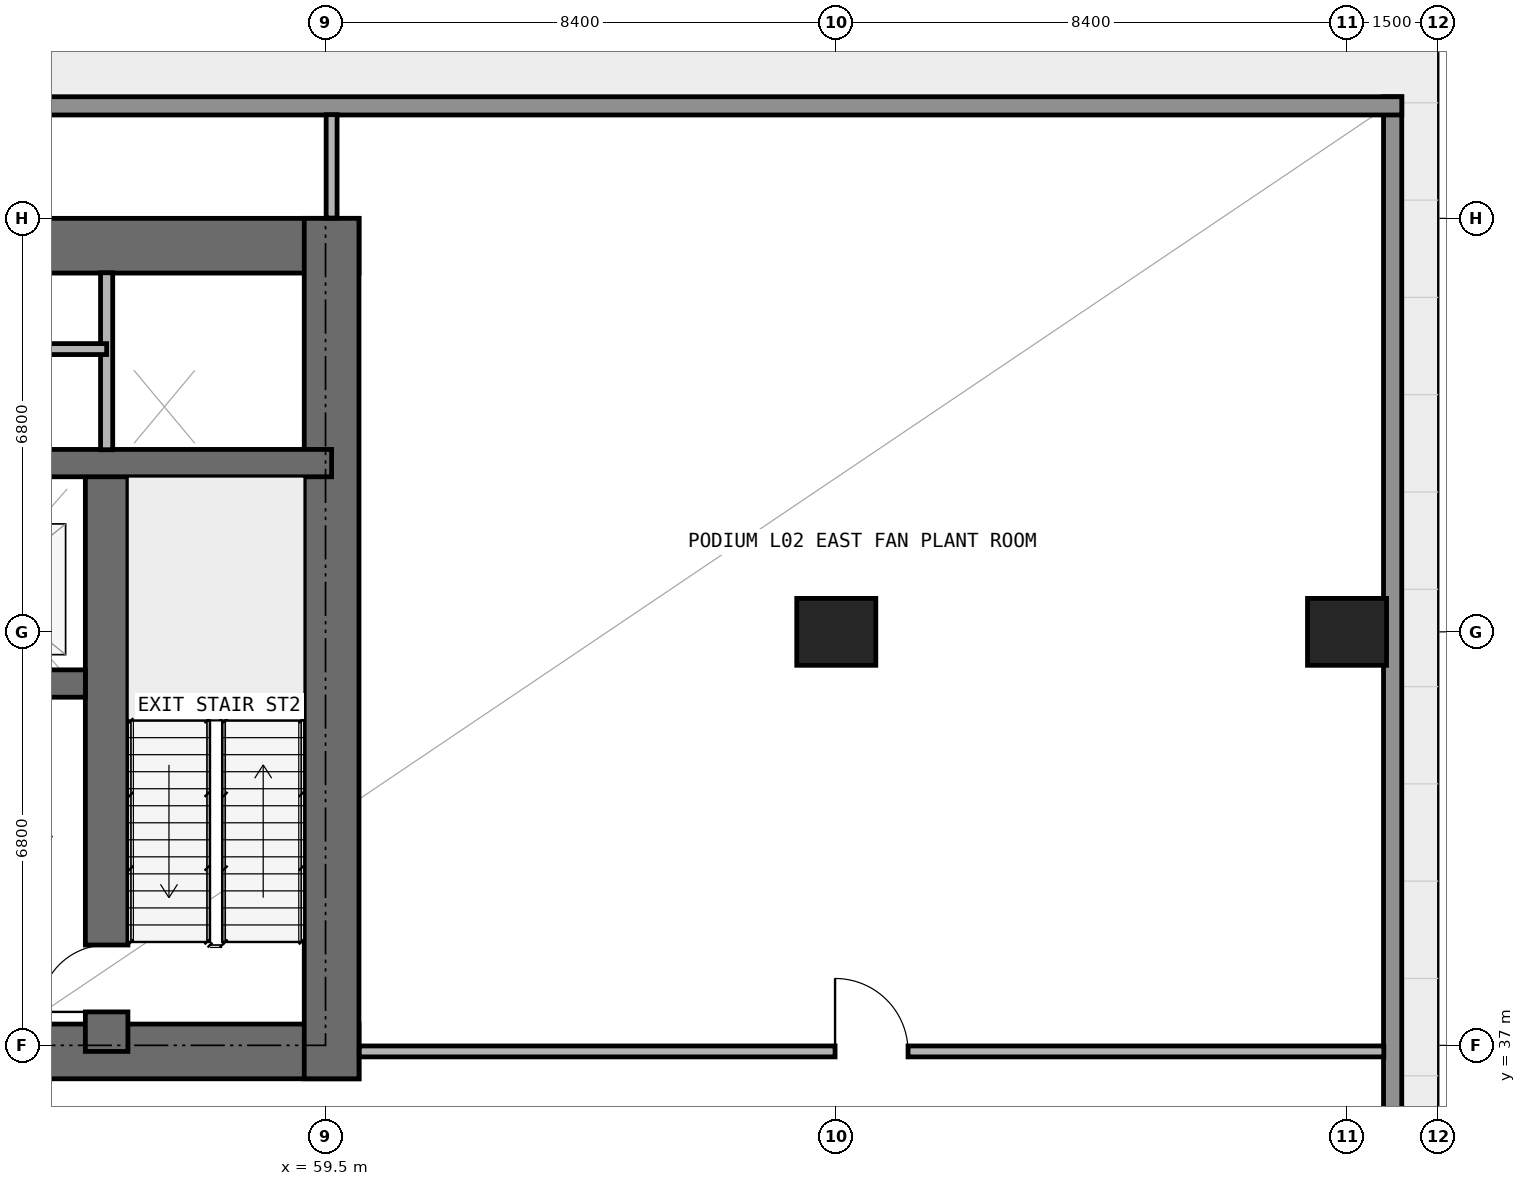
"""IFC4 building model, lengths in metres.
Left out: names, types, materials, properties, quantities, classifications, styles, units other than length and angle.
Written with IfcOpenShell. Run it as: python <this file> out.ifc"""

import sys

from ifc_helpers import new_model, si_unit, direction, frame, frame_2d, origin, origin_2d, place, context, subcontext, project, spatial, rectangle, extrude, element, fill, save


model = new_model("IFC4")
c1 = context("Model", 3, precision=1e-05, world=origin(), true_north=direction((0.0, 1.0)))
c2 = subcontext(c1, "Body", "Model", "MODEL_VIEW")
j1 = project(units=[si_unit("LENGTHUNIT", "METRE"), si_unit("PLANEANGLEUNIT", "RADIAN")], contexts=[c1])
p1 = place(None, origin())
s1 = spatial("IfcSite", under=j1, at=p1, CompositionType="ELEMENT")
p2 = place(p1, origin())
s2 = spatial("IfcBuilding", under=s1, at=p2, CompositionType="ELEMENT")
p3 = place(p2, frame((0.0, 0.0, 10.2)))
s3 = spatial("IfcBuildingStorey", under=s2, at=p3, CompositionType="ELEMENT", Elevation=10.2)
for number, where, z_axis, x_axis in (
    (1, (67.9, 43.8, 0.0), (0.0, 0.0, 1.0), (1.0, 0.0, 0.0)),
    (2, (76.3, 43.8, 0.0), (0.0, 0.0, 1.0), (1.0, 0.0, 0.0)),
):
    element("IfcColumn", number, at=place(p3, frame(where, z_axis=z_axis, x_axis=x_axis)), inside=s3, PredefinedType="COLUMN", context=c2, shape_type="SweptSolid", body=[
        extrude(rectangle(XDim=1.3, YDim=1.1, at=origin_2d()), origin(), (0.0, 0.0, 1.0), 4.5),
    ])
p4 = place(p3, frame((17.75, 36.9, 0.0), z_axis=(0.0, 0.0, 1.0), x_axis=(1.0, 0.0, 0.0)))
e3 = element("IfcWall", 3, at=p4, inside=s3, PredefinedType="SHEAR", context=c2, shape_type="SweptSolid", body=[
    extrude(rectangle(XDim=42.3, YDim=0.9, at=frame_2d((21.15, 0.0))), origin(), (0.0, 0.0, 1.0), 4.5),
])
p5 = place(p4, frame((14.55, 0.0, 0.0)))
e4 = element("IfcOpeningElement", 4, at=p5, cuts=e3, PredefinedType="OPENING", context=c2, shape_type="SweptSolid", body=[
    extrude(rectangle(XDim=1.1, YDim=2.15, at=frame_2d((0.55, 1.075))), frame((0.0, 0.46, 0.0), z_axis=(0.0, -1.0, 0.0), x_axis=(1.0, 0.0, 0.0)), (0.0, 0.0, 1.0), 0.92),
])
p6 = place(p4, frame((6.4, 0.0, 0.0)))
e5 = element("IfcOpeningElement", 5, at=p6, cuts=e3, PredefinedType="OPENING", context=c2, shape_type="SweptSolid", body=[
    extrude(rectangle(XDim=1.05, YDim=2.15, at=frame_2d((0.525, 1.075))), frame((0.0, 0.46, 0.0), z_axis=(0.0, -1.0, 0.0), x_axis=(1.0, 0.0, 0.0)), (0.0, 0.0, 1.0), 0.92),
])
p7 = place(p4, frame((34.9, 0.0, 0.0)))
e6 = element("IfcOpeningElement", 6, at=p7, cuts=e3, PredefinedType="OPENING", context=c2, shape_type="SweptSolid", body=[
    extrude(rectangle(XDim=1.05, YDim=2.15, at=frame_2d((0.525, 1.075))), frame((0.0, 0.46, 0.0), z_axis=(0.0, -1.0, 0.0), x_axis=(1.0, 0.0, 0.0)), (0.0, 0.0, 1.0), 0.92),
])
p8 = place(p4, frame((11.012, 0.0, 0.0)))
e7 = element("IfcOpeningElement", 7, at=p8, cuts=e3, PredefinedType="OPENING", context=c2, shape_type="SweptSolid", body=[
    extrude(rectangle(XDim=1.05, YDim=2.15, at=frame_2d((0.525, 1.075))), frame((0.0, 0.46, 0.0), z_axis=(0.0, -1.0, 0.0), x_axis=(1.0, 0.0, 0.0)), (0.0, 0.0, 1.0), 0.92),
])
p9 = place(p4, frame((24.25, 0.0, 0.0)))
e8 = element("IfcOpeningElement", 8, at=p9, cuts=e3, PredefinedType="OPENING", context=c2, shape_type="SweptSolid", body=[
    extrude(rectangle(XDim=1.05, YDim=2.15, at=frame_2d((0.525, 1.075))), frame((0.0, 0.46, 0.0), z_axis=(0.0, -1.0, 0.0), x_axis=(1.0, 0.0, 0.0)), (0.0, 0.0, 1.0), 0.92),
])
p10 = place(p3, frame((17.75, 50.15, 0.0), z_axis=(0.0, 0.0, 1.0), x_axis=(1.0, 0.0, 0.0)))
e9 = element("IfcWall", 9, at=p10, inside=s3, PredefinedType="SHEAR", context=c2, shape_type="SweptSolid", body=[
    extrude(rectangle(XDim=42.3, YDim=0.9, at=frame_2d((21.15, 0.0))), origin(), (0.0, 0.0, 1.0), 4.5),
])
p11 = place(p3, frame((59.6, 36.45, 0.0), z_axis=(0.0, 0.0, 1.0), x_axis=(0.0, 1.0, 0.0)))
e10 = element("IfcWall", 10, at=p11, inside=s3, PredefinedType="SHEAR", context=c2, shape_type="SweptSolid", body=[
    extrude(rectangle(XDim=14.15, YDim=0.9, at=frame_2d((7.075, 0.0))), origin(), (0.0, 0.0, 1.0), 4.5),
])
p12 = place(p3, frame((55.9, 36.9, 0.0), z_axis=(0.0, 0.0, 1.0), x_axis=(0.0, 1.0, 0.0)))
e11 = element("IfcWall", 11, at=p12, inside=s3, PredefinedType="SHEAR", context=c2, shape_type="SweptSolid", body=[
    extrude(rectangle(XDim=9.675, YDim=0.7, at=frame_2d((4.837, 0.0))), origin(), (0.0, 0.0, 1.0), 4.5),
])
p13 = place(p12, frame((0.65, 0.0, 0.0)))
e12 = element("IfcOpeningElement", 12, at=p13, cuts=e11, PredefinedType="OPENING", context=c2, shape_type="SweptSolid", body=[
    extrude(rectangle(XDim=1.1, YDim=2.15, at=frame_2d((0.55, 1.075))), frame((0.0, 0.36, 0.0), z_axis=(0.0, -1.0, 0.0), x_axis=(1.0, 0.0, 0.0)), (0.0, 0.0, 1.0), 0.72),
])
p14 = place(p3, frame((22.25, 42.95, 0.0), z_axis=(0.0, 0.0, 1.0), x_axis=(1.0, 0.0, 0.0)))
e13 = element("IfcWall", 13, at=p14, inside=s3, PredefinedType="SHEAR", context=c2, shape_type="SweptSolid", body=[
    extrude(rectangle(XDim=33.3, YDim=0.45, at=frame_2d((16.65, 0.0))), origin(), (0.0, 0.0, 1.0), 4.5),
])
p15 = place(p14, frame((1.05, 0.0, 0.0)))
e14 = element("IfcOpeningElement", 14, at=p15, cuts=e13, PredefinedType="OPENING", context=c2, shape_type="SweptSolid", body=[
    extrude(rectangle(XDim=1.2, YDim=2.2, at=frame_2d((0.6, 1.1))), frame((0.0, 0.235, 0.0), z_axis=(0.0, -1.0, 0.0), x_axis=(1.0, 0.0, 0.0)), (0.0, 0.0, 1.0), 0.47),
])
p16 = place(p14, frame((31.05, 0.0, 0.0)))
e15 = element("IfcOpeningElement", 15, at=p16, cuts=e13, PredefinedType="OPENING", context=c2, shape_type="SweptSolid", body=[
    extrude(rectangle(XDim=1.2, YDim=2.2, at=frame_2d((0.6, 1.1))), frame((0.0, 0.235, 0.0), z_axis=(0.0, -1.0, 0.0), x_axis=(1.0, 0.0, 0.0)), (0.0, 0.0, 1.0), 0.47),
])
p17 = place(p14, frame((13.5, 0.0, 0.0)))
e16 = element("IfcOpeningElement", 16, at=p17, cuts=e13, PredefinedType="OPENING", context=c2, shape_type="SweptSolid", body=[
    extrude(rectangle(XDim=1.1, YDim=2.2, at=frame_2d((0.55, 1.1))), frame((0.0, 0.235, 0.0), z_axis=(0.0, -1.0, 0.0), x_axis=(1.0, 0.0, 0.0)), (0.0, 0.0, 1.0), 0.47),
])
p18 = place(p14, frame((16.1, 0.0, 0.0)))
e17 = element("IfcOpeningElement", 17, at=p18, cuts=e13, PredefinedType="OPENING", context=c2, shape_type="SweptSolid", body=[
    extrude(rectangle(XDim=1.1, YDim=2.2, at=frame_2d((0.55, 1.1))), frame((0.0, 0.235, 0.0), z_axis=(0.0, -1.0, 0.0), x_axis=(1.0, 0.0, 0.0)), (0.0, 0.0, 1.0), 0.47),
])
p19 = place(p14, frame((18.7, 0.0, 0.0)))
e18 = element("IfcOpeningElement", 18, at=p19, cuts=e13, PredefinedType="OPENING", context=c2, shape_type="SweptSolid", body=[
    extrude(rectangle(XDim=1.1, YDim=2.2, at=frame_2d((0.55, 1.1))), frame((0.0, 0.235, 0.0), z_axis=(0.0, -1.0, 0.0), x_axis=(1.0, 0.0, 0.0)), (0.0, 0.0, 1.0), 0.47),
])
p20 = place(p14, frame((3.625, 0.0, 0.0)))
e19 = element("IfcOpeningElement", 19, at=p20, cuts=e13, PredefinedType="OPENING", context=c2, shape_type="SweptSolid", body=[
    extrude(rectangle(XDim=1.05, YDim=2.15, at=frame_2d((0.525, 1.075))), frame((0.0, 0.235, 0.0), z_axis=(0.0, -1.0, 0.0), x_axis=(1.0, 0.0, 0.0)), (0.0, 0.0, 1.0), 0.47),
])
p21 = place(p14, frame((28.675, 0.0, 0.0)))
e20 = element("IfcOpeningElement", 20, at=p21, cuts=e13, PredefinedType="OPENING", context=c2, shape_type="SweptSolid", body=[
    extrude(rectangle(XDim=1.05, YDim=2.15, at=frame_2d((0.525, 1.075))), frame((0.0, 0.235, 0.0), z_axis=(0.0, -1.0, 0.0), x_axis=(1.0, 0.0, 0.0)), (0.0, 0.0, 1.0), 0.47),
])
p22 = place(p3, frame((18.2, 46.575, 0.0), z_axis=(0.0, 0.0, 1.0), x_axis=(1.0, 0.0, 0.0)))
e21 = element("IfcWall", 21, at=p22, inside=s3, PredefinedType="SHEAR", context=c2, shape_type="SweptSolid", body=[
    extrude(rectangle(XDim=41.4, YDim=0.45, at=frame_2d((20.7, 0.0))), origin(), (0.0, 0.0, 1.0), 4.5),
])
p23 = place(p22, frame((7.7, 0.0, 0.0)))
e22 = element("IfcOpeningElement", 22, at=p23, cuts=e21, PredefinedType="OPENING", context=c2, shape_type="SweptSolid", body=[
    extrude(rectangle(XDim=1.0, YDim=2.2, at=frame_2d((0.5, 1.1))), frame((0.0, 0.235, 0.0), z_axis=(0.0, -1.0, 0.0), x_axis=(1.0, 0.0, 0.0)), (0.0, 0.0, 1.0), 0.47),
])
p24 = place(p22, frame((32.725, 0.0, 0.0)))
e23 = element("IfcOpeningElement", 23, at=p24, cuts=e21, PredefinedType="OPENING", context=c2, shape_type="SweptSolid", body=[
    extrude(rectangle(XDim=1.05, YDim=2.15, at=frame_2d((0.525, 1.075))), frame((0.0, 0.235, 0.0), z_axis=(0.0, -1.0, 0.0), x_axis=(1.0, 0.0, 0.0)), (0.0, 0.0, 1.0), 0.47),
])
p25 = place(p3, frame((77.05, 52.6, 0.0), z_axis=(0.0, 0.0, 1.0), x_axis=(0.0, -1.0, 0.0)))
e24 = element("IfcWall", 24, at=p25, inside=s3, PredefinedType="STANDARD", context=c2, shape_type="SweptSolid", body=[
    extrude(rectangle(XDim=25.8, YDim=0.3, at=frame_2d((12.9, 0.0))), origin(), (0.0, 0.0, 1.0), 4.5),
])
p26 = place(p3, frame((0.6, 52.45, 0.0), z_axis=(0.0, 0.0, 1.0), x_axis=(1.0, 0.0, 0.0)))
e25 = element("IfcWall", 25, at=p26, inside=s3, PredefinedType="STANDARD", context=c2, shape_type="SweptSolid", body=[
    extrude(rectangle(XDim=76.6, YDim=0.3, at=frame_2d((38.3, 0.0))), origin(), (0.0, 0.0, 1.0), 4.5),
])
p27 = place(p3, frame((55.9, 46.795, 0.0), z_axis=(0.0, 0.0, 1.0), x_axis=(0.0, 1.0, 0.0)))
e26 = element("IfcWall", 26, at=p27, inside=s3, PredefinedType="PARTITIONING", context=c2, shape_type="SweptSolid", body=[
    extrude(rectangle(XDim=2.91, YDim=0.2, at=frame_2d((1.455, 0.0))), origin(), (0.0, 0.0, 1.0), 4.5),
])
p28 = place(p3, frame((59.6, 50.605, 0.0), z_axis=(0.0, 0.0, 1.0), x_axis=(0.0, 1.0, 0.0)))
e27 = element("IfcWall", 27, at=p28, inside=s3, PredefinedType="PARTITIONING", context=c2, shape_type="SweptSolid", body=[
    extrude(rectangle(XDim=1.7, YDim=0.18, at=frame_2d((0.85, 0.0))), origin(), (0.0, 0.0, 1.0), 4.5),
])
p29 = place(p3, frame((60.055, 36.9, 0.0), z_axis=(0.0, 0.0, 1.0), x_axis=(1.0, 0.0, 0.0)))
e28 = element("IfcWall", 28, at=p29, inside=s3, PredefinedType="PARTITIONING", context=c2, shape_type="SweptSolid", body=[
    extrude(rectangle(XDim=16.85, YDim=0.18, at=frame_2d((8.425, 0.0))), origin(), (0.0, 0.0, 1.0), 4.5),
])
p30 = place(p29, frame((7.825, 0.0, 0.0)))
e29 = element("IfcOpeningElement", 29, at=p30, cuts=e28, PredefinedType="OPENING", context=c2, shape_type="SweptSolid", body=[
    extrude(rectangle(XDim=1.2, YDim=2.2, at=frame_2d((0.6, 1.1))), frame((0.0, 0.1, 0.0), z_axis=(0.0, -1.0, 0.0), x_axis=(1.0, 0.0, 0.0)), (0.0, 0.0, 1.0), 0.2),
])
p31 = place(p3, frame((41.2, 48.45, 0.0), z_axis=(0.0, 0.0, 1.0), x_axis=(1.0, 0.0, 0.0)))
e30 = element("IfcWall", 30, at=p31, inside=s3, PredefinedType="PARTITIONING", context=c2, shape_type="SweptSolid", body=[
    extrude(rectangle(XDim=14.7, YDim=0.18, at=frame_2d((7.35, 0.0))), origin(), (0.0, 0.0, 1.0), 4.5),
])
p32 = place(p31, frame((1.85, 0.0, 0.0)))
e31 = element("IfcOpeningElement", 31, at=p32, cuts=e30, PredefinedType="OPENING", context=c2, shape_type="SweptSolid", body=[
    extrude(rectangle(XDim=1.2, YDim=2.2, at=frame_2d((0.6, 1.1))), frame((0.0, 0.1, 0.0), z_axis=(0.0, -1.0, 0.0), x_axis=(1.0, 0.0, 0.0)), (0.0, 0.0, 1.0), 0.2),
])
p33 = place(p31, frame((6.75, 0.0, 0.0)))
e32 = element("IfcOpeningElement", 32, at=p33, cuts=e30, PredefinedType="OPENING", context=c2, shape_type="SweptSolid", body=[
    extrude(rectangle(XDim=1.2, YDim=2.2, at=frame_2d((0.6, 1.1))), frame((0.0, 0.1, 0.0), z_axis=(0.0, -1.0, 0.0), x_axis=(1.0, 0.0, 0.0)), (0.0, 0.0, 1.0), 0.2),
])
p34 = place(p31, frame((11.825, 0.0, 0.0)))
e33 = element("IfcOpeningElement", 33, at=p34, cuts=e30, PredefinedType="OPENING", context=c2, shape_type="SweptSolid", body=[
    extrude(rectangle(XDim=0.85, YDim=2.1, at=frame_2d((0.425, 1.05))), frame((0.0, 0.1, 0.0), z_axis=(0.0, -1.0, 0.0), x_axis=(1.0, 0.0, 0.0)), (0.0, 0.0, 1.0), 0.2),
])
p35 = place(p13, origin())
e34 = element("IfcDoor", 34, at=p35, inside=s3, OperationType="SINGLE_SWING_LEFT", PredefinedType="DOOR", context=c2, shape_type="SweptSolid", body=[
    extrude(rectangle(XDim=1.1, YDim=2.15, at=frame_2d((0.55, 1.075))), frame((0.0, 0.025, 0.0), z_axis=(0.0, -1.0, 0.0), x_axis=(1.0, 0.0, 0.0)), (0.0, 0.0, 1.0), 0.05),
])
fill(e12, e34)
p36 = place(p30, origin())
e35 = element("IfcDoor", 35, at=p36, inside=s3, OperationType="SINGLE_SWING_LEFT", PredefinedType="DOOR", context=c2, shape_type="SweptSolid", body=[
    extrude(rectangle(XDim=1.2, YDim=2.2, at=frame_2d((0.6, 1.1))), frame((0.0, 0.025, 0.0), z_axis=(0.0, -1.0, 0.0), x_axis=(1.0, 0.0, 0.0)), (0.0, 0.0, 1.0), 0.05),
])
fill(e29, e35)
save(model, sys.argv[1])
